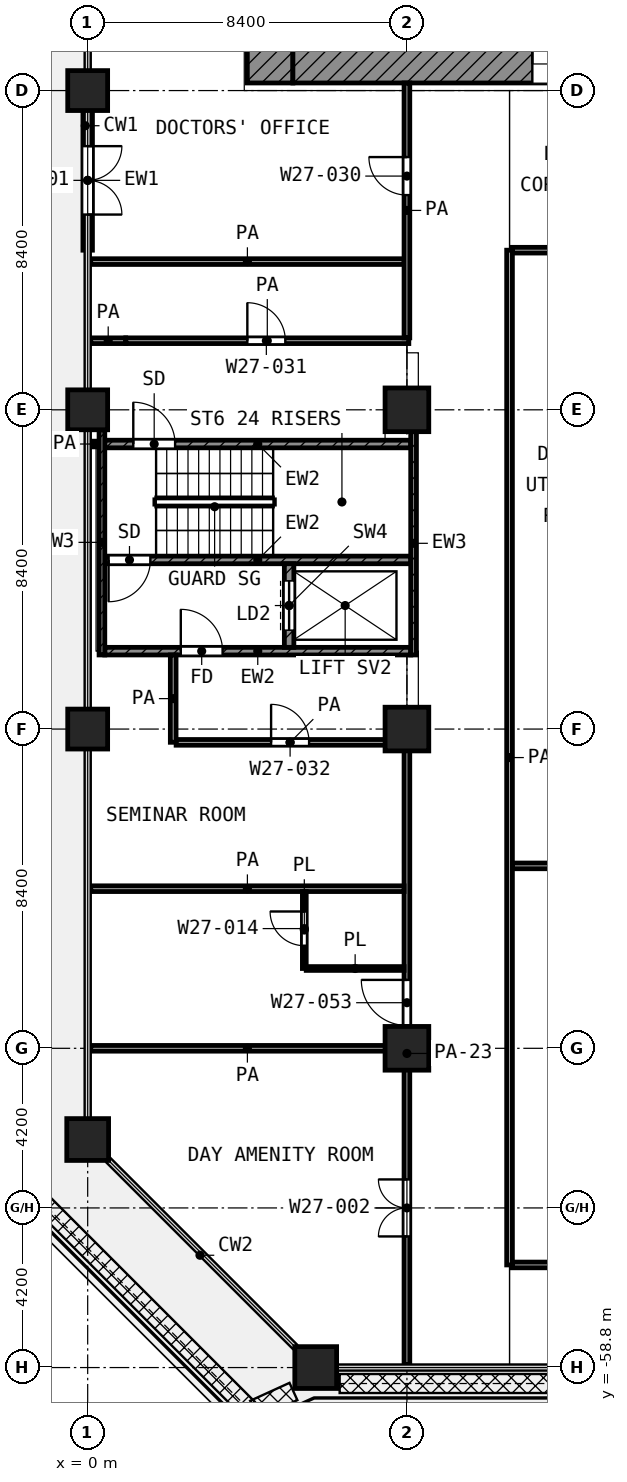
"""IFC4 building model, lengths in metres.
Left out: names, types, materials, properties, quantities, classifications, styles, units other than length and angle.
Written with IfcOpenShell. Run it as: python <this file> out.ifc"""

import sys

from ifc_helpers import new_model, si_unit, direction, frame, frame_2d, origin, origin_2d, place, context, subcontext, project, spatial, rectangle, extrude, element, fill, save


model = new_model("IFC4")
c1 = context("Model", 3, precision=1e-05, world=origin(), true_north=direction((0.0, 1.0)))
c2 = subcontext(c1, "Body", "Model", "MODEL_VIEW")
j1 = project(units=[si_unit("LENGTHUNIT", "METRE"), si_unit("PLANEANGLEUNIT", "RADIAN")], contexts=[c1])
p1 = place(None, origin())
s1 = spatial("IfcSite", under=j1, at=p1, CompositionType="ELEMENT")
p2 = place(p1, origin())
s2 = spatial("IfcBuilding", under=s1, at=p2, CompositionType="ELEMENT")
p3 = place(p2, frame((0.0, 0.0, 140.8)))
s3 = spatial("IfcBuildingStorey", under=s2, at=p3, CompositionType="ELEMENT", Elevation=140.8)
for number, where, z_axis, x_axis in (
    (1, (0.0, -25.2, 0.0), (0.0, 0.0, 1.0), (1.0, 0.0, 0.0)),
    (2, (0.0, -33.6, 0.0), (0.0, 0.0, 1.0), (1.0, 0.0, 0.0)),
):
    element("IfcColumn", number, at=place(p3, frame(where, z_axis=z_axis, x_axis=x_axis)), inside=s3, PredefinedType="COLUMN", context=c2, shape_type="SweptSolid", body=[
        extrude(rectangle(XDim=1.05, YDim=1.05, at=origin_2d()), origin(), (0.0, 0.0, 1.0), 4.2),
    ])
p4 = place(p3, frame((8.4, -33.6, 0.0), z_axis=(0.0, 0.0, 1.0), x_axis=(1.0, 0.0, 0.0)))
e3 = element("IfcColumn", 3, at=p4, inside=s3, PredefinedType="COLUMN", context=c2, shape_type="SweptSolid", body=[
    extrude(rectangle(XDim=1.15, YDim=1.15, at=origin_2d()), origin(), (0.0, 0.0, 1.0), 4.2),
])
p5 = place(p3, frame((0.0, -42.0, 0.0), z_axis=(0.0, 0.0, 1.0), x_axis=(1.0, 0.0, 0.0)))
e4 = element("IfcColumn", 4, at=p5, inside=s3, PredefinedType="COLUMN", context=c2, shape_type="SweptSolid", body=[
    extrude(rectangle(XDim=1.05, YDim=1.05, at=origin_2d()), origin(), (0.0, 0.0, 1.0), 4.2),
])
for number, where, z_axis, x_axis in (
    (5, (8.4, -42.0, 0.0), (0.0, 0.0, 1.0), (1.0, 0.0, 0.0)),
    (6, (8.4, -50.4, 0.0), (0.0, 0.0, 1.0), (1.0, 0.0, 0.0)),
):
    element("IfcColumn", number, at=place(p3, frame(where, z_axis=z_axis, x_axis=x_axis)), inside=s3, PredefinedType="COLUMN", context=c2, shape_type="SweptSolid", body=[
        extrude(rectangle(XDim=1.15, YDim=1.15, at=origin_2d()), origin(), (0.0, 0.0, 1.0), 4.2),
    ])
for number, where, z_axis, x_axis in (
    (7, (0.0, -52.8, 0.0), (0.0, 0.0, 1.0), (1.0, 0.0, 0.0)),
    (8, (6.0, -58.8, 0.0), (0.0, 0.0, 1.0), (1.0, 0.0, 0.0)),
):
    element("IfcColumn", number, at=place(p3, frame(where, z_axis=z_axis, x_axis=x_axis)), inside=s3, PredefinedType="COLUMN", context=c2, shape_type="SweptSolid", body=[
        extrude(rectangle(XDim=1.1, YDim=1.1, at=origin_2d()), origin(), (0.0, 0.0, 1.0), 4.2),
    ])
p6 = place(p3, frame((0.0, -25.725, 0.0), z_axis=(0.0, 0.0, 1.0), x_axis=(0.0, -1.0, 0.0)))
e9 = element("IfcWall", 9, at=p6, inside=s3, PredefinedType="SOLIDWALL", context=c2, shape_type="SweptSolid", body=[
    extrude(rectangle(XDim=3.675, YDim=0.25, at=frame_2d((1.837, 0.0))), origin(), (0.0, 0.0, 1.0), 3.48),
])
p7 = place(p6, frame((0.938, 0.0, 0.0)))
e10 = element("IfcOpeningElement", 10, at=p7, cuts=e9, PredefinedType="OPENING", context=c2, shape_type="SweptSolid", body=[
    extrude(rectangle(XDim=1.8, YDim=2.1, at=frame_2d((0.9, 1.05))), frame((0.0, 0.135, 0.0), z_axis=(0.0, -1.0, 0.0), x_axis=(1.0, 0.0, 0.0)), (0.0, 0.0, 1.0), 0.27),
])
p8 = place(p3, frame((4.8, -25.0, 0.0), z_axis=(0.0, 0.0, 1.0), x_axis=(0.0, 1.0, 0.0)))
e11 = element("IfcWall", 11, at=p8, inside=s3, PredefinedType="SHEAR", context=c2, shape_type="SweptSolid", body=[
    extrude(rectangle(XDim=19.6, YDim=1.2, at=frame_2d((9.8, 0.0))), origin(), (0.0, 0.0, 1.0), 3.6),
])
p9 = place(p8, frame((11.45, 0.0, 0.0)))
e12 = element("IfcOpeningElement", 12, at=p9, cuts=e11, PredefinedType="OPENING", context=c2, shape_type="SweptSolid", body=[
    extrude(rectangle(XDim=1.1, YDim=2.1, at=frame_2d((0.55, 1.05))), frame((0.0, 0.61, 0.0), z_axis=(0.0, -1.0, 0.0), x_axis=(1.0, 0.0, 0.0)), (0.0, 0.0, 1.0), 1.22),
])
p10 = place(p8, frame((2.15, 0.0, 0.0)))
e13 = element("IfcOpeningElement", 13, at=p10, cuts=e11, PredefinedType="OPENING", context=c2, shape_type="SweptSolid", body=[
    extrude(rectangle(XDim=1.1, YDim=2.1, at=frame_2d((0.55, 1.05))), frame((0.0, 0.61, 0.0), z_axis=(0.0, -1.0, 0.0), x_axis=(1.0, 0.0, 0.0)), (0.0, 0.0, 1.0), 1.22),
])
p11 = place(p3, frame((5.4, -24.5, 0.0), z_axis=(0.0, 0.0, 1.0), x_axis=(1.0, 0.0, 0.0)))
e14 = element("IfcWall", 14, at=p11, inside=s3, PredefinedType="SHEAR", context=c2, shape_type="SweptSolid", body=[
    extrude(rectangle(XDim=18.6, YDim=1.0, at=frame_2d((9.3, 0.0))), origin(), (0.0, 0.0, 1.0), 3.6),
])
p12 = place(p11, frame((6.3, 0.0, 0.0)))
e15 = element("IfcOpeningElement", 15, at=p12, cuts=e14, PredefinedType="OPENING", context=c2, shape_type="SweptSolid", body=[
    extrude(rectangle(XDim=1.8, YDim=2.1, at=frame_2d((0.9, 1.05))), frame((0.0, 0.51, 0.0), z_axis=(0.0, -1.0, 0.0), x_axis=(1.0, 0.0, 0.0)), (0.0, 0.0, 1.0), 1.02),
])
p13 = place(p3, frame((0.375, -40.05, 0.0), z_axis=(0.0, 0.0, 1.0), x_axis=(0.0, 1.0, 0.0)))
e16 = element("IfcWall", 16, at=p13, inside=s3, PredefinedType="SHEAR", context=c2, shape_type="SweptSolid", body=[
    extrude(rectangle(XDim=5.925, YDim=0.15, at=frame_2d((2.962, 0.0))), origin(), (0.0, 0.0, 1.0), 3.6),
])
p14 = place(p3, frame((8.575, -40.05, 0.0), z_axis=(0.0, 0.0, 1.0), x_axis=(0.0, 1.0, 0.0)))
e17 = element("IfcWall", 17, at=p14, inside=s3, PredefinedType="SHEAR", context=c2, shape_type="SweptSolid", body=[
    extrude(rectangle(XDim=5.875, YDim=0.15, at=frame_2d((2.938, 0.0))), origin(), (0.0, 0.0, 1.0), 3.6),
])
p15 = place(p3, frame((0.45, -34.5, 0.0), z_axis=(0.0, 0.0, 1.0), x_axis=(1.0, 0.0, 0.0)))
e18 = element("IfcWall", 18, at=p15, inside=s3, PredefinedType="SHEAR", context=c2, shape_type="SweptSolid", body=[
    extrude(rectangle(XDim=8.05, YDim=0.2, at=frame_2d((4.025, 0.0))), origin(), (0.0, 0.0, 1.0), 3.6),
])
p16 = place(p15, frame((0.75, 0.0, 0.0)))
e19 = element("IfcOpeningElement", 19, at=p16, cuts=e18, PredefinedType="OPENING", context=c2, shape_type="SweptSolid", body=[
    extrude(rectangle(XDim=1.1, YDim=2.1, at=frame_2d((0.55, 1.05))), frame((0.0, 0.11, 0.0), z_axis=(0.0, -1.0, 0.0), x_axis=(1.0, 0.0, 0.0)), (0.0, 0.0, 1.0), 0.22),
])
p17 = place(p3, frame((0.45, -37.55, 0.0), z_axis=(0.0, 0.0, 1.0), x_axis=(1.0, 0.0, 0.0)))
e20 = element("IfcWall", 20, at=p17, inside=s3, PredefinedType="SHEAR", context=c2, shape_type="SweptSolid", body=[
    extrude(rectangle(XDim=8.05, YDim=0.2, at=frame_2d((4.025, 0.0))), origin(), (0.0, 0.0, 1.0), 3.6),
])
p18 = place(p17, frame((0.1, 0.0, 0.0)))
e21 = element("IfcOpeningElement", 21, at=p18, cuts=e20, PredefinedType="OPENING", context=c2, shape_type="SweptSolid", body=[
    extrude(rectangle(XDim=1.1, YDim=2.1, at=frame_2d((0.55, 1.05))), frame((0.0, 0.11, 0.0), z_axis=(0.0, -1.0, 0.0), x_axis=(1.0, 0.0, 0.0)), (0.0, 0.0, 1.0), 0.22),
])
p19 = place(p3, frame((0.45, -39.95, 0.0), z_axis=(0.0, 0.0, 1.0), x_axis=(1.0, 0.0, 0.0)))
e22 = element("IfcWall", 22, at=p19, inside=s3, PredefinedType="SHEAR", context=c2, shape_type="SweptSolid", body=[
    extrude(rectangle(XDim=8.05, YDim=0.2, at=frame_2d((4.025, 0.0))), origin(), (0.0, 0.0, 1.0), 3.6),
])
p20 = place(p19, frame((2.0, 0.0, 0.0)))
e23 = element("IfcOpeningElement", 23, at=p20, cuts=e22, PredefinedType="OPENING", context=c2, shape_type="SweptSolid", body=[
    extrude(rectangle(XDim=1.1, YDim=2.1, at=frame_2d((0.55, 1.05))), frame((0.0, 0.11, 0.0), z_axis=(0.0, -1.0, 0.0), x_axis=(1.0, 0.0, 0.0)), (0.0, 0.0, 1.0), 0.22),
])
p21 = place(p3, frame((5.3, -39.85, 0.0), z_axis=(0.0, 0.0, 1.0), x_axis=(0.0, 1.0, 0.0)))
e24 = element("IfcWall", 24, at=p21, inside=s3, PredefinedType="SHEAR", context=c2, shape_type="SweptSolid", body=[
    extrude(rectangle(XDim=2.2, YDim=0.25, at=frame_2d((1.1, 0.0))), origin(), (0.0, 0.0, 1.0), 3.6),
])
p22 = place(p21, frame((0.45, 0.0, 0.0)))
e25 = element("IfcOpeningElement", 25, at=p22, cuts=e24, PredefinedType="OPENING", context=c2, shape_type="SweptSolid", body=[
    extrude(rectangle(XDim=1.3, YDim=2.1, at=frame_2d((0.65, 1.05))), frame((0.0, 0.135, 0.0), z_axis=(0.0, -1.0, 0.0), x_axis=(1.0, 0.0, 0.0)), (0.0, 0.0, 1.0), 0.27),
])
p23 = place(p3, frame((5.75, -48.3, 0.0), z_axis=(0.0, 0.0, 1.0), x_axis=(1.0, 0.0, 0.0)))
e26 = element("IfcWall", 26, at=p23, inside=s3, PredefinedType="PARTITIONING", context=c2, shape_type="SweptSolid", body=[
    extrude(rectangle(XDim=2.575, YDim=0.1, at=frame_2d((1.288, 0.0))), origin(), (0.0, 0.0, 1.0), 3.6),
])
p24 = place(p3, frame((5.7, -48.3, 0.0), z_axis=(0.0, 0.0, 1.0), x_axis=(0.0, 1.0, 0.0)))
e27 = element("IfcWall", 27, at=p24, inside=s3, PredefinedType="PARTITIONING", context=c2, shape_type="SweptSolid", body=[
    extrude(rectangle(XDim=2.025, YDim=0.1, at=frame_2d((1.013, 0.0))), origin(), (0.0, 0.0, 1.0), 3.6),
])
p25 = place(p24, frame((0.6, 0.0, 0.0)))
e28 = element("IfcOpeningElement", 28, at=p25, cuts=e27, PredefinedType="OPENING", context=c2, shape_type="SweptSolid", body=[
    extrude(rectangle(XDim=0.9, YDim=2.1, at=frame_2d((0.45, 1.05))), frame((0.0, 0.06, 0.0), z_axis=(0.0, -1.0, 0.0), x_axis=(1.0, 0.0, 0.0)), (0.0, 0.0, 1.0), 0.12),
])
p26 = place(p3, frame((11.175, -56.1, 0.0), z_axis=(0.0, 0.0, 1.0), x_axis=(1.0, 0.0, 0.0)))
e29 = element("IfcWall", 29, at=p26, inside=s3, PredefinedType="PARTITIONING", context=c2, shape_type="SweptSolid", body=[
    extrude(rectangle(XDim=2.85, YDim=0.15, at=frame_2d((1.425, 0.0))), origin(), (0.0, 0.0, 1.0), 3.6),
])
for number, where, z_axis, x_axis in (
    (30, (0.08, -50.4, 0.0), (0.0, 0.0, 1.0), (1.0, 0.0, 0.0)),
    (31, (0.08, -46.2, 0.0), (0.0, 0.0, 1.0), (1.0, 0.0, 0.0)),
):
    element("IfcWall", number, at=place(p3, frame(where, z_axis=z_axis, x_axis=x_axis)), inside=s3, PredefinedType="PARTITIONING", context=c2, shape_type="SweptSolid", body=[
        extrude(rectangle(XDim=8.245, YDim=0.15, at=frame_2d((4.123, 0.0))), origin(), (0.0, 0.0, 1.0), 3.6),
    ])
p27 = place(p3, frame((11.175, -45.6, 0.0), z_axis=(0.0, 0.0, 1.0), x_axis=(1.0, 0.0, 0.0)))
e32 = element("IfcWall", 32, at=p27, inside=s3, PredefinedType="PARTITIONING", context=c2, shape_type="SweptSolid", body=[
    extrude(rectangle(XDim=2.85, YDim=0.15, at=frame_2d((1.425, 0.0))), origin(), (0.0, 0.0, 1.0), 3.6),
])
p28 = place(p3, frame((2.327, -42.35, 0.0), z_axis=(0.0, 0.0, 1.0), x_axis=(1.0, 0.0, 0.0)))
e33 = element("IfcWall", 33, at=p28, inside=s3, PredefinedType="PARTITIONING", context=c2, shape_type="SweptSolid", body=[
    extrude(rectangle(XDim=5.998, YDim=0.15, at=frame_2d((2.999, 0.0))), origin(), (0.0, 0.0, 1.0), 3.6),
])
p29 = place(p28, frame((2.499, 0.0, 0.0)))
e34 = element("IfcOpeningElement", 34, at=p29, cuts=e33, PredefinedType="OPENING", context=c2, shape_type="SweptSolid", body=[
    extrude(rectangle(XDim=1.0, YDim=2.1, at=frame_2d((0.5, 1.05))), frame((0.0, 0.085, 0.0), z_axis=(0.0, -1.0, 0.0), x_axis=(1.0, 0.0, 0.0)), (0.0, 0.0, 1.0), 0.17),
])
p30 = place(p3, frame((0.08, -34.5, 0.0), z_axis=(0.0, 0.0, 1.0), x_axis=(1.0, 0.0, 0.0)))
e35 = element("IfcWall", 35, at=p30, inside=s3, PredefinedType="PARTITIONING", context=c2, shape_type="SweptSolid", body=[
    extrude(rectangle(XDim=0.19, YDim=0.15, at=frame_2d((0.095, 0.0))), origin(), (0.0, 0.0, 1.0), 3.6),
])
p31 = place(p3, frame((0.08, -31.782, 0.0), z_axis=(0.0, 0.0, 1.0), x_axis=(1.0, 0.0, 0.0)))
e36 = element("IfcWall", 36, at=p31, inside=s3, PredefinedType="PARTITIONING", context=c2, shape_type="SweptSolid", body=[
    extrude(rectangle(XDim=0.92, YDim=0.15, at=frame_2d((0.46, 0.0))), origin(), (0.0, 0.0, 1.0), 3.6),
])
p32 = place(p3, frame((1.002, -31.782, 0.0), z_axis=(0.0, 0.0, 1.0), x_axis=(1.0, 0.0, 0.0)))
e37 = element("IfcWall", 37, at=p32, inside=s3, PredefinedType="PARTITIONING", context=c2, shape_type="SweptSolid", body=[
    extrude(rectangle(XDim=7.448, YDim=0.15, at=frame_2d((3.724, 0.0))), origin(), (0.0, 0.0, 1.0), 3.6),
])
p33 = place(p32, frame((3.199, 0.0, 0.0)))
e38 = element("IfcOpeningElement", 38, at=p33, cuts=e37, PredefinedType="OPENING", context=c2, shape_type="SweptSolid", body=[
    extrude(rectangle(XDim=1.0, YDim=2.1, at=frame_2d((0.5, 1.05))), frame((0.0, 0.085, 0.0), z_axis=(0.0, -1.0, 0.0), x_axis=(1.0, 0.0, 0.0)), (0.0, 0.0, 1.0), 0.17),
])
p34 = place(p3, frame((0.08, -29.7, 0.0), z_axis=(0.0, 0.0, 1.0), x_axis=(1.0, 0.0, 0.0)))
e39 = element("IfcWall", 39, at=p34, inside=s3, PredefinedType="PARTITIONING", context=c2, shape_type="SweptSolid", body=[
    extrude(rectangle(XDim=8.245, YDim=0.15, at=frame_2d((4.123, 0.0))), origin(), (0.0, 0.0, 1.0), 3.6),
])
p35 = place(p3, frame((11.175, -29.4, 0.0), z_axis=(0.0, 0.0, 1.0), x_axis=(1.0, 0.0, 0.0)))
e40 = element("IfcWall", 40, at=p35, inside=s3, PredefinedType="PARTITIONING", context=c2, shape_type="SweptSolid", body=[
    extrude(rectangle(XDim=2.85, YDim=0.15, at=frame_2d((1.425, 0.0))), origin(), (0.0, 0.0, 1.0), 3.6),
])
p36 = place(p3, frame((2.25, -42.348, 0.0), z_axis=(0.0, 0.0, 1.0), x_axis=(0.0, 1.0, 0.0)))
e41 = element("IfcWall", 41, at=p36, inside=s3, PredefinedType="PARTITIONING", context=c2, shape_type="SweptSolid", body=[
    extrude(rectangle(XDim=2.298, YDim=0.15, at=frame_2d((1.149, 0.0))), origin(), (0.0, 0.0, 1.0), 3.6),
])
p37 = place(p3, frame((8.4, -58.72, 0.0), z_axis=(0.0, 0.0, 1.0), x_axis=(0.0, 1.0, 0.0)))
e42 = element("IfcWall", 42, at=p37, inside=s3, PredefinedType="PARTITIONING", context=c2, shape_type="SweptSolid", body=[
    extrude(rectangle(XDim=16.37, YDim=0.15, at=frame_2d((8.185, 0.0))), origin(), (0.0, 0.0, 1.0), 2.7),
])
p38 = place(p37, frame((8.92, 0.0, 0.0)))
e43 = element("IfcOpeningElement", 43, at=p38, cuts=e42, PredefinedType="OPENING", context=c2, shape_type="SweptSolid", body=[
    extrude(rectangle(XDim=1.2, YDim=2.1, at=frame_2d((0.6, 1.05))), frame((0.0, 0.085, 0.0), z_axis=(0.0, -1.0, 0.0), x_axis=(1.0, 0.0, 0.0)), (0.0, 0.0, 1.0), 0.17),
])
p39 = place(p37, frame((3.37, 0.0, 0.0)))
e44 = element("IfcOpeningElement", 44, at=p39, cuts=e42, PredefinedType="OPENING", context=c2, shape_type="SweptSolid", body=[
    extrude(rectangle(XDim=1.5, YDim=2.1, at=frame_2d((0.75, 1.05))), frame((0.0, 0.085, 0.0), z_axis=(0.0, -1.0, 0.0), x_axis=(1.0, 0.0, 0.0)), (0.0, 0.0, 1.0), 0.17),
])
p40 = place(p3, frame((8.4, -31.707, 0.0), z_axis=(0.0, 0.0, 1.0), x_axis=(0.0, 1.0, 0.0)))
e45 = element("IfcWall", 45, at=p40, inside=s3, PredefinedType="PARTITIONING", context=c2, shape_type="SweptSolid", body=[
    extrude(rectangle(XDim=6.707, YDim=0.15, at=frame_2d((3.354, 0.0))), origin(), (0.0, 0.0, 1.0), 3.6),
])
p41 = place(p40, frame((3.757, 0.0, 0.0)))
e46 = element("IfcOpeningElement", 46, at=p41, cuts=e45, PredefinedType="OPENING", context=c2, shape_type="SweptSolid", body=[
    extrude(rectangle(XDim=1.0, YDim=2.1, at=frame_2d((0.5, 1.05))), frame((0.0, 0.085, 0.0), z_axis=(0.0, -1.0, 0.0), x_axis=(1.0, 0.0, 0.0)), (0.0, 0.0, 1.0), 0.17),
])
p42 = place(p3, frame((11.1, -56.1, 0.0), z_axis=(0.0, 0.0, 1.0), x_axis=(0.0, 1.0, 0.0)))
e47 = element("IfcWall", 47, at=p42, inside=s3, PredefinedType="PARTITIONING", context=c2, shape_type="SweptSolid", body=[
    extrude(rectangle(XDim=26.7, YDim=0.15, at=frame_2d((13.35, 0.0))), origin(), (0.0, 0.0, 1.0), 3.6),
])
p43 = place(p7, origin())
e48 = element("IfcDoor", 48, at=p43, inside=s3, OperationType="DOUBLE_DOOR_SINGLE_SWING", PredefinedType="DOOR", context=c2, shape_type="SweptSolid", body=[
    extrude(rectangle(XDim=1.8, YDim=2.1, at=frame_2d((0.9, 1.05))), frame((0.0, 0.025, 0.0), z_axis=(0.0, -1.0, 0.0), x_axis=(1.0, 0.0, 0.0)), (0.0, 0.0, 1.0), 0.05),
])
fill(e10, e48)
p44 = place(p12, origin())
e49 = element("IfcDoor", 49, at=p44, inside=s3, OperationType="DOUBLE_DOOR_SINGLE_SWING", PredefinedType="DOOR", context=c2, shape_type="SweptSolid", body=[
    extrude(rectangle(XDim=1.8, YDim=2.1, at=frame_2d((0.9, 1.05))), frame((0.0, 0.025, 0.0), z_axis=(0.0, -1.0, 0.0), x_axis=(1.0, 0.0, 0.0)), (0.0, 0.0, 1.0), 0.05),
])
fill(e15, e49)
p45 = place(p16, origin())
e50 = element("IfcDoor", 50, at=p45, inside=s3, OperationType="SINGLE_SWING_LEFT", PredefinedType="DOOR", context=c2, shape_type="SweptSolid", body=[
    extrude(rectangle(XDim=1.1, YDim=2.1, at=frame_2d((0.55, 1.05))), frame((0.0, 0.025, 0.0), z_axis=(0.0, -1.0, 0.0), x_axis=(1.0, 0.0, 0.0)), (0.0, 0.0, 1.0), 0.05),
])
fill(e19, e50)
p46 = place(p18, frame((1.1, 0.0, 0.0), z_axis=(0.0, 0.0, 1.0), x_axis=(-1.0, 0.0, 0.0)))
e51 = element("IfcDoor", 51, at=p46, inside=s3, OperationType="SINGLE_SWING_LEFT", PredefinedType="DOOR", context=c2, shape_type="SweptSolid", body=[
    extrude(rectangle(XDim=1.1, YDim=2.1, at=frame_2d((0.55, 1.05))), frame((0.0, 0.025, 0.0), z_axis=(0.0, -1.0, 0.0), x_axis=(1.0, 0.0, 0.0)), (0.0, 0.0, 1.0), 0.05),
])
fill(e21, e51)
p47 = place(p22, origin())
e52 = element("IfcDoor", 52, at=p47, inside=s3, OperationType="DOUBLE_DOOR_SLIDING", PredefinedType="DOOR", context=c2, shape_type="SweptSolid", body=[
    extrude(rectangle(XDim=1.3, YDim=2.1, at=frame_2d((0.65, 1.05))), frame((0.0, 0.025, 0.0), z_axis=(0.0, -1.0, 0.0), x_axis=(1.0, 0.0, 0.0)), (0.0, 0.0, 1.0), 0.05),
])
fill(e25, e52)
p48 = place(p20, origin())
e53 = element("IfcDoor", 53, at=p48, inside=s3, OperationType="SINGLE_SWING_LEFT", PredefinedType="DOOR", context=c2, shape_type="SweptSolid", body=[
    extrude(rectangle(XDim=1.1, YDim=2.1, at=frame_2d((0.55, 1.05))), frame((0.0, 0.025, 0.0), z_axis=(0.0, -1.0, 0.0), x_axis=(1.0, 0.0, 0.0)), (0.0, 0.0, 1.0), 0.05),
])
fill(e23, e53)
p49 = place(p41, origin())
e54 = element("IfcDoor", 54, at=p49, inside=s3, OperationType="SINGLE_SWING_RIGHT", PredefinedType="DOOR", context=c2, shape_type="SweptSolid", body=[
    extrude(rectangle(XDim=1.0, YDim=2.1, at=frame_2d((0.5, 1.05))), frame((0.0, 0.025, 0.0), z_axis=(0.0, -1.0, 0.0), x_axis=(1.0, 0.0, 0.0)), (0.0, 0.0, 1.0), 0.05),
])
fill(e46, e54)
p50 = place(p33, origin())
e55 = element("IfcDoor", 55, at=p50, inside=s3, OperationType="SINGLE_SWING_LEFT", PredefinedType="DOOR", context=c2, shape_type="SweptSolid", body=[
    extrude(rectangle(XDim=1.0, YDim=2.1, at=frame_2d((0.5, 1.05))), frame((0.0, 0.025, 0.0), z_axis=(0.0, -1.0, 0.0), x_axis=(1.0, 0.0, 0.0)), (0.0, 0.0, 1.0), 0.05),
])
fill(e38, e55)
p51 = place(p29, origin())
e56 = element("IfcDoor", 56, at=p51, inside=s3, OperationType="SINGLE_SWING_LEFT", PredefinedType="DOOR", context=c2, shape_type="SweptSolid", body=[
    extrude(rectangle(XDim=1.0, YDim=2.1, at=frame_2d((0.5, 1.05))), frame((0.0, 0.025, 0.0), z_axis=(0.0, -1.0, 0.0), x_axis=(1.0, 0.0, 0.0)), (0.0, 0.0, 1.0), 0.05),
])
fill(e34, e56)
p52 = place(p38, origin())
e57 = element("IfcDoor", 57, at=p52, inside=s3, OperationType="SINGLE_SWING_RIGHT", PredefinedType="DOOR", context=c2, shape_type="SweptSolid", body=[
    extrude(rectangle(XDim=1.2, YDim=2.1, at=frame_2d((0.6, 1.05))), frame((0.0, 0.025, 0.0), z_axis=(0.0, -1.0, 0.0), x_axis=(1.0, 0.0, 0.0)), (0.0, 0.0, 1.0), 0.05),
])
fill(e43, e57)
p53 = place(p25, origin())
e58 = element("IfcDoor", 58, at=p53, inside=s3, OperationType="SINGLE_SWING_RIGHT", PredefinedType="DOOR", context=c2, shape_type="SweptSolid", body=[
    extrude(rectangle(XDim=0.9, YDim=2.1, at=frame_2d((0.45, 1.05))), frame((0.0, 0.025, 0.0), z_axis=(0.0, -1.0, 0.0), x_axis=(1.0, 0.0, 0.0)), (0.0, 0.0, 1.0), 0.05),
])
fill(e28, e58)
p54 = place(p39, origin())
e59 = element("IfcDoor", 59, at=p54, inside=s3, OperationType="DOUBLE_DOOR_SINGLE_SWING", PredefinedType="DOOR", context=c2, shape_type="SweptSolid", body=[
    extrude(rectangle(XDim=1.5, YDim=2.1, at=frame_2d((0.75, 1.05))), frame((0.0, 0.025, 0.0), z_axis=(0.0, -1.0, 0.0), x_axis=(1.0, 0.0, 0.0)), (0.0, 0.0, 1.0), 0.05),
])
fill(e44, e59)
save(model, sys.argv[1])
